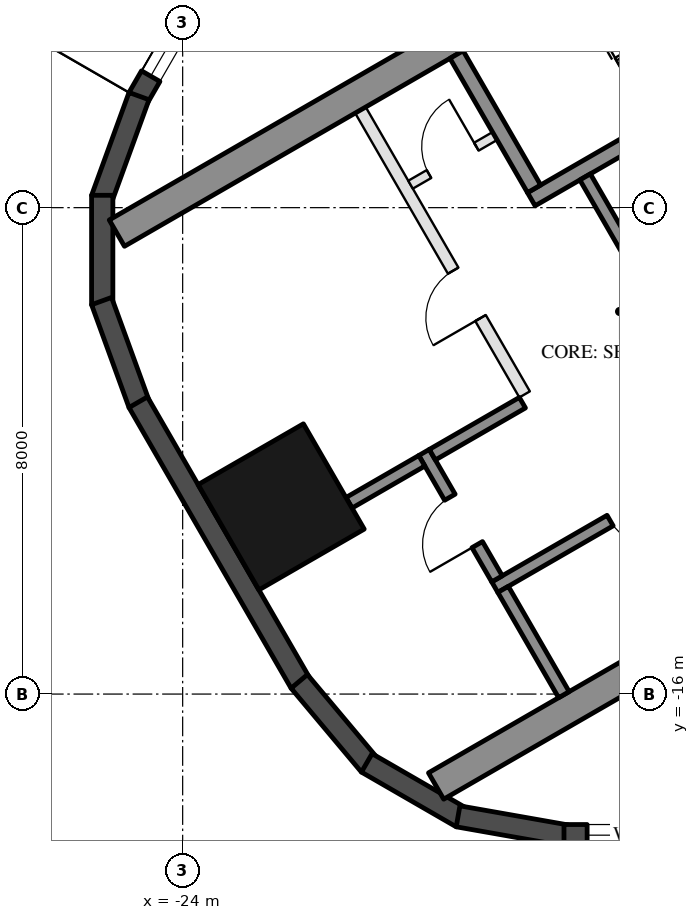
"""IFC4 building model, lengths in metres.
Left out: names, types, materials, properties, quantities, classifications, styles, units other than length and angle.
Written with IfcOpenShell. Run it as: python <this file> out.ifc"""

import sys

from ifc_helpers import new_model, si_unit, direction, frame, frame_2d, origin, origin_2d, place, context, subcontext, project, spatial, rectangle, hollow_rectangle, extrude, boolean, halfspace, element, fill, save


model = new_model("IFC4")
c1 = context("Model", 3, precision=1e-05, world=origin(), true_north=direction((0.0, 1.0)))
c2 = subcontext(c1, "Body", "Model", "MODEL_VIEW")
j1 = project(units=[si_unit("LENGTHUNIT", "METRE"), si_unit("PLANEANGLEUNIT", "RADIAN")], contexts=[c1])
p1 = place(None, origin())
s1 = spatial("IfcSite", under=j1, at=p1, CompositionType="ELEMENT")
p2 = place(p1, origin())
s2 = spatial("IfcBuilding", under=s1, at=p2, CompositionType="ELEMENT")
p3 = place(p2, frame((0.0, 0.0, 268.9)))
s3 = spatial("IfcBuildingStorey", under=s2, at=p3, CompositionType="ELEMENT", Elevation=268.9)
p4 = place(p3, frame((-22.38, -12.921, 0.0), z_axis=(0.0, 0.0, 1.0), x_axis=(-0.5, 0.866025403784, 0.0)))
e1 = element("IfcColumn", 1, at=p4, inside=s3, PredefinedType="COLUMN", context=c2, shape_type="SweptSolid", body=[
    boolean("DIFFERENCE", extrude(hollow_rectangle(XDim=2.0, YDim=2.0, WallThickness=0.05, at=origin_2d()), origin(), (0.0, 0.0, 1.0), 3.7), halfspace(frame((0.0, 0.0, 0.113), z_axis=(0.0, 0.0, 1.0), x_axis=(1.0, 0.0, 0.0)), True)),
])
p5 = place(p3, frame((-22.86, -2.953, 0.0), z_axis=(0.0, 0.0, 1.0), x_axis=(-0.50001992892, -0.866013897511, 0.0)))
e2 = element("IfcWall", 2, at=p5, inside=s3, PredefinedType="SOLIDWALL", context=c2, shape_type="SweptSolid", body=[
    extrude(rectangle(XDim=3.741, YDim=0.35, at=frame_2d((1.871, 0.0))), origin(), (0.0, 0.0, 1.0), 3.55),
])
p6 = place(p5, frame((2.531, 0.0, 0.3)))
e3 = element("IfcOpeningElement", 3, at=p6, cuts=e2, PredefinedType="OPENING", context=c2, shape_type="SweptSolid", body=[
    extrude(rectangle(XDim=0.8, YDim=2.65, at=frame_2d((0.4, 1.325))), frame((0.0, 0.185, 0.0), z_axis=(0.0, -1.0, 0.0), x_axis=(1.0, 0.0, 0.0)), (0.0, 0.0, 1.0), 0.37),
])
p7 = place(p3, frame((-24.718, -6.165, 0.0), z_axis=(0.0, 0.0, 1.0), x_axis=(-0.34206975284, -0.939674562916, 0.0)))
e4 = element("IfcWall", 4, at=p7, inside=s3, PredefinedType="SOLIDWALL", context=c2, shape_type="SweptSolid", body=[
    extrude(rectangle(XDim=1.8, YDim=0.35, at=frame_2d((0.9, 0.0))), origin(), (0.0, 0.0, 1.0), 3.55),
])
p8 = place(p3, frame((-25.323, -7.797, 0.0), z_axis=(0.0, 0.0, 1.0), x_axis=(0.0, -1.0, 0.0)))
e5 = element("IfcWall", 5, at=p8, inside=s3, PredefinedType="SOLIDWALL", context=c2, shape_type="SweptSolid", body=[
    extrude(rectangle(XDim=1.8, YDim=0.35, at=frame_2d((0.9, 0.0))), origin(), (0.0, 0.0, 1.0), 3.55),
])
p9 = place(p3, frame((-25.333, -9.537, 0.0), z_axis=(0.0, 0.0, 1.0), x_axis=(0.34206975284, -0.939674562916, 0.0)))
e6 = element("IfcWall", 6, at=p9, inside=s3, PredefinedType="SOLIDWALL", context=c2, shape_type="SweptSolid", body=[
    extrude(rectangle(XDim=1.8, YDim=0.35, at=frame_2d((0.9, 0.0))), origin(), (0.0, 0.0, 1.0), 3.55),
])
p10 = place(p3, frame((-24.731, -11.2, 0.0), z_axis=(0.0, 0.0, 1.0), x_axis=(0.500025039717, -0.866010946615, 0.0)))
e7 = element("IfcWall", 7, at=p10, inside=s3, PredefinedType="SOLIDWALL", context=c2, shape_type="SweptSolid", body=[
    extrude(rectangle(XDim=5.331, YDim=0.35, at=frame_2d((2.666, 0.0))), origin(), (0.0, 0.0, 1.0), 3.55),
])
p11 = place(p3, frame((-22.083, -15.792, 0.0), z_axis=(0.0, 0.0, 1.0), x_axis=(0.642756114672, -0.766070869471, 0.0)))
e8 = element("IfcWall", 8, at=p11, inside=s3, PredefinedType="SOLIDWALL", context=c2, shape_type="SweptSolid", body=[
    extrude(rectangle(XDim=1.8, YDim=0.35, at=frame_2d((0.9, 0.0))), origin(), (0.0, 0.0, 1.0), 3.55),
])
p12 = place(p3, frame((-20.972, -17.132, 0.0), z_axis=(0.0, 0.0, 1.0), x_axis=(0.866047807691, -0.499961193289, 0.0)))
e9 = element("IfcWall", 9, at=p12, inside=s3, PredefinedType="SOLIDWALL", context=c2, shape_type="SweptSolid", body=[
    extrude(rectangle(XDim=1.8, YDim=0.35, at=frame_2d((0.9, 0.0))), origin(), (0.0, 0.0, 1.0), 3.55),
])
p13 = place(p3, frame((-19.471, -18.011, 0.0), z_axis=(0.0, 0.0, 1.0), x_axis=(0.984810858511, -0.173630564586, 0.0)))
e10 = element("IfcWall", 10, at=p13, inside=s3, PredefinedType="SOLIDWALL", context=c2, shape_type="SweptSolid", body=[
    extrude(rectangle(XDim=1.8, YDim=0.35, at=frame_2d((0.9, 0.0))), origin(), (0.0, 0.0, 1.0), 3.55),
])
p14 = place(p3, frame((-17.729, -18.321, 0.0), z_axis=(0.0, 0.0, 1.0), x_axis=(1.0, 0.0, 0.0)))
e11 = element("IfcWall", 11, at=p14, inside=s3, PredefinedType="SOLIDWALL", context=c2, shape_type="SweptSolid", body=[
    extrude(rectangle(XDim=11.185, YDim=0.35, at=frame_2d((5.593, 0.0))), origin(), (0.0, 0.0, 1.0), 3.55),
])
p15 = place(p14, frame((0.381, 0.0, 0.3)))
e12 = element("IfcOpeningElement", 12, at=p15, cuts=e11, PredefinedType="OPENING", context=c2, shape_type="SweptSolid", body=[
    extrude(rectangle(XDim=1.7, YDim=2.65, at=frame_2d((0.85, 1.325))), frame((0.0, 0.185, 0.0), z_axis=(0.0, -1.0, 0.0), x_axis=(1.0, 0.0, 0.0)), (0.0, 0.0, 1.0), 0.37),
])
p16 = place(p14, frame((7.21, 0.0, 0.0)))
e13 = element("IfcOpeningElement", 13, at=p16, cuts=e11, PredefinedType="OPENING", context=c2, shape_type="SweptSolid", body=[
    extrude(rectangle(XDim=2.4, YDim=2.4, at=frame_2d((1.2, 1.2))), frame((0.0, 0.185, 0.0), z_axis=(0.0, -1.0, 0.0), x_axis=(1.0, 0.0, 0.0)), (0.0, 0.0, 1.0), 0.37),
])
p17 = place(p14, frame((3.516, 0.0, 0.3)))
e14 = element("IfcOpeningElement", 14, at=p17, cuts=e11, PredefinedType="OPENING", context=c2, shape_type="SweptSolid", body=[
    extrude(rectangle(XDim=1.5, YDim=2.65, at=frame_2d((0.75, 1.325))), frame((0.0, 0.185, 0.0), z_axis=(0.0, -1.0, 0.0), x_axis=(1.0, 0.0, 0.0)), (0.0, 0.0, 1.0), 0.37),
])
p18 = place(p14, frame((5.316, 0.0, 0.3)))
e15 = element("IfcOpeningElement", 15, at=p18, cuts=e11, PredefinedType="OPENING", context=c2, shape_type="SweptSolid", body=[
    extrude(rectangle(XDim=1.5, YDim=2.65, at=frame_2d((0.75, 1.325))), frame((0.0, 0.185, 0.0), z_axis=(0.0, -1.0, 0.0), x_axis=(1.0, 0.0, 0.0)), (0.0, 0.0, 1.0), 0.37),
])
for number, where, z_axis, x_axis in (
    (16, (-13.797, -1.903, 0.0), (0.0, 0.0, 1.0), (-0.866, -0.5, 0.0)),
    (17, (-8.547, -10.997, 0.0), (0.0, 0.0, 1.0), (-0.866, -0.5, 0.0)),
):
    element("IfcWall", number, at=place(p3, frame(where, z_axis=z_axis, x_axis=x_axis)), inside=s3, PredefinedType="SHEAR", context=c2, shape_type="SweptSolid", body=[
        extrude(rectangle(XDim=13.031, YDim=0.5, at=frame_2d((6.516, 0.0))), origin(), (0.0, 0.0, 1.0), 3.5),
    ])
p19 = place(p3, frame((-12.681, -4.636, 0.0), z_axis=(0.0, 0.0, 1.0), x_axis=(-0.866021702275, -0.500006411147, 0.0)))
e18 = element("IfcWall", 18, at=p19, inside=s3, PredefinedType="SHEAR", context=c2, shape_type="SweptSolid", body=[
    extrude(rectangle(XDim=6.45, YDim=0.25, at=frame_2d((3.225, 0.0))), origin(), (0.0, 0.0, 1.0), 3.5),
])
p20 = place(p19, frame((0.3, 0.0, 0.0)))
e19 = element("IfcOpeningElement", 19, at=p20, cuts=e18, PredefinedType="OPENING", context=c2, shape_type="SweptSolid", body=[
    extrude(rectangle(XDim=1.0, YDim=2.1, at=frame_2d((0.5, 1.05))), frame((0.0, 0.135, 0.0), z_axis=(0.0, -1.0, 0.0), x_axis=(1.0, 0.0, 0.0)), (0.0, 0.0, 1.0), 0.27),
])
p21 = place(p3, frame((-19.496, -5.482, 0.0), z_axis=(0.0, 0.0, 1.0), x_axis=(0.499990435942, -0.866030925526, 0.0)))
e20 = element("IfcWall", 20, at=p21, inside=s3, PredefinedType="SHEAR", context=c2, shape_type="SweptSolid", body=[
    extrude(rectangle(XDim=2.55, YDim=0.25, at=frame_2d((1.275, 0.0))), origin(), (0.0, 0.0, 1.0), 3.5),
])
p22 = place(p3, frame((-17.381, -7.495, 0.0), z_axis=(0.0, 0.0, 1.0), x_axis=(0.500011755427, -0.866018616679, 0.0)))
e21 = element("IfcWall", 21, at=p22, inside=s3, PredefinedType="SHEAR", context=c2, shape_type="SweptSolid", body=[
    extrude(rectangle(XDim=2.8, YDim=0.2, at=frame_2d((1.4, 0.0))), origin(), (0.0, 0.0, 1.0), 3.5),
])
p23 = place(p3, frame((-10.068, -9.162, 0.0), z_axis=(0.0, 0.0, 1.0), x_axis=(-0.866032725843, -0.499987317609, 0.0)))
e22 = element("IfcWall", 22, at=p23, inside=s3, PredefinedType="SHEAR", context=c2, shape_type="SweptSolid", body=[
    extrude(rectangle(XDim=10.16, YDim=0.2, at=frame_2d((5.08, 0.0))), origin(), (0.0, 0.0, 1.0), 3.5),
])
p24 = place(p23, frame((1.99, 0.0, 0.0)))
e23 = element("IfcOpeningElement", 23, at=p24, cuts=e22, PredefinedType="OPENING", context=c2, shape_type="SweptSolid", body=[
    extrude(rectangle(XDim=0.9, YDim=2.1, at=frame_2d((0.45, 1.05))), frame((0.0, 0.11, 0.0), z_axis=(0.0, -1.0, 0.0), x_axis=(1.0, 0.0, 0.0)), (0.0, 0.0, 1.0), 0.22),
])
p25 = place(p23, frame((7.07, 0.0, 0.0)))
e24 = element("IfcOpeningElement", 24, at=p25, cuts=e22, PredefinedType="OPENING", context=c2, shape_type="SweptSolid", body=[
    extrude(rectangle(XDim=0.9, YDim=2.1, at=frame_2d((0.45, 1.05))), frame((0.0, 0.11, 0.0), z_axis=(0.0, -1.0, 0.0), x_axis=(1.0, 0.0, 0.0)), (0.0, 0.0, 1.0), 0.22),
])
p26 = place(p3, frame((-20.031, -12.026, 0.0), z_axis=(0.0, 0.0, 1.0), x_axis=(0.500033551112, -0.866006032174, 0.0)))
e25 = element("IfcWall", 25, at=p26, inside=s3, PredefinedType="SHEAR", context=c2, shape_type="SweptSolid", body=[
    extrude(rectangle(XDim=2.4, YDim=0.2, at=frame_2d((1.2, 0.0))), origin(), (0.0, 0.0, 1.0), 3.5),
])
p27 = place(p26, frame((0.85, 0.0, 0.0)))
e26 = element("IfcOpeningElement", 26, at=p27, cuts=e25, PredefinedType="OPENING", context=c2, shape_type="SweptSolid", body=[
    extrude(rectangle(XDim=0.9, YDim=2.1, at=frame_2d((0.45, 1.05))), frame((0.0, 0.11, 0.0), z_axis=(0.0, -1.0, 0.0), x_axis=(1.0, 0.0, 0.0)), (0.0, 0.0, 1.0), 0.22),
])
p28 = place(p3, frame((-18.413, -11.208, 0.0), z_axis=(0.0, 0.0, 1.0), x_axis=(-0.866038183914, -0.499977863513, 0.0)))
e27 = element("IfcWall", 27, at=p28, inside=s3, PredefinedType="SHEAR", context=c2, shape_type="SweptSolid", body=[
    extrude(rectangle(XDim=1.71, YDim=0.2, at=frame_2d((0.855, 0.0))), origin(), (0.0, 0.0, 1.0), 3.5),
])
p29 = place(p3, frame((-18.73, -14.278, 0.0), z_axis=(0.0, 0.0, 1.0), x_axis=(0.50002537861, -0.866010750942, 0.0)))
e28 = element("IfcWall", 28, at=p29, inside=s3, PredefinedType="SHEAR", context=c2, shape_type="SweptSolid", body=[
    extrude(rectangle(XDim=2.0, YDim=0.2, at=frame_2d((1.0, 0.0))), origin(), (0.0, 0.0, 1.0), 3.5),
])
p30 = place(p3, frame((-20.067, -12.163, 0.0), z_axis=(0.0, 0.0, 1.0), x_axis=(-0.866094443108, -0.499880401313, 0.0)))
e29 = element("IfcWall", 29, at=p30, inside=s3, PredefinedType="SHEAR", context=c2, shape_type="SweptSolid", body=[
    extrude(rectangle(XDim=1.383, YDim=0.2, at=frame_2d((0.691, 0.0))), origin(), (0.0, 0.0, 1.0), 3.5),
])
p31 = place(p3, frame((-21.076, -6.395, 0.0), z_axis=(0.0, 0.0, 1.0), x_axis=(0.50001468107, -0.866016927499, 0.0)))
e30 = element("IfcWall", 30, at=p31, inside=s3, PredefinedType="PARTITIONING", context=c2, shape_type="SweptSolid", body=[
    extrude(rectangle(XDim=5.4, YDim=0.2, at=frame_2d((2.7, 0.0))), origin(), (0.0, 0.0, 1.0), 3.5),
])
p32 = place(p31, frame((3.05, 0.0, 0.0)))
e31 = element("IfcOpeningElement", 31, at=p32, cuts=e30, PredefinedType="OPENING", context=c2, shape_type="SweptSolid", body=[
    extrude(rectangle(XDim=0.9, YDim=2.1, at=frame_2d((0.45, 1.05))), frame((0.0, 0.11, 0.0), z_axis=(0.0, -1.0, 0.0), x_axis=(1.0, 0.0, 0.0)), (0.0, 0.0, 1.0), 0.22),
])
p33 = place(p3, frame((-18.866, -6.822, 0.0), z_axis=(0.0, 0.0, 1.0), x_axis=(-0.866028054938, -0.499995408039, 0.0)))
e32 = element("IfcWall", 32, at=p33, inside=s3, PredefinedType="PARTITIONING", context=c2, shape_type="SweptSolid", body=[
    extrude(rectangle(XDim=1.6, YDim=0.15, at=frame_2d((0.8, 0.0))), origin(), (0.0, 0.0, 1.0), 3.5),
])
p34 = place(p33, frame((0.35, 0.0, 0.0)))
e33 = element("IfcOpeningElement", 33, at=p34, cuts=e32, PredefinedType="OPENING", context=c2, shape_type="SweptSolid", body=[
    extrude(rectangle(XDim=0.9, YDim=2.1, at=frame_2d((0.45, 1.05))), frame((0.0, 0.085, 0.0), z_axis=(0.0, -1.0, 0.0), x_axis=(1.0, 0.0, 0.0)), (0.0, 0.0, 1.0), 0.17),
])
p35 = place(p15, origin())
e34 = element("IfcWindow", 34, at=p35, inside=s3, PartitioningType="SINGLE_PANEL", PredefinedType="WINDOW", context=c2, shape_type="SweptSolid", body=[
    extrude(rectangle(XDim=1.7, YDim=2.65, at=frame_2d((0.85, 1.325))), frame((0.0, 0.03, 0.0), z_axis=(0.0, -1.0, 0.0), x_axis=(1.0, 0.0, 0.0)), (0.0, 0.0, 1.0), 0.06),
])
fill(e12, e34)
p36 = place(p6, origin())
e35 = element("IfcWindow", 35, at=p36, inside=s3, PartitioningType="SINGLE_PANEL", PredefinedType="WINDOW", context=c2, shape_type="SweptSolid", body=[
    extrude(rectangle(XDim=0.8, YDim=2.65, at=frame_2d((0.4, 1.325))), frame((0.0, 0.03, 0.0), z_axis=(0.0, -1.0, 0.0), x_axis=(1.0, 0.0, 0.0)), (0.0, 0.0, 1.0), 0.06),
])
fill(e3, e35)
p37 = place(p34, frame((0.9, 0.0, 0.0), z_axis=(0.0, 0.0, 1.0), x_axis=(-1.0, 0.0, 0.0)))
e36 = element("IfcDoor", 36, at=p37, inside=s3, OperationType="SINGLE_SWING_RIGHT", PredefinedType="DOOR", context=c2, shape_type="SweptSolid", body=[
    extrude(rectangle(XDim=0.9, YDim=2.1, at=frame_2d((0.45, 1.05))), frame((0.0, 0.025, 0.0), z_axis=(0.0, -1.0, 0.0), x_axis=(1.0, 0.0, 0.0)), (0.0, 0.0, 1.0), 0.05),
])
fill(e33, e36)
p38 = place(p25, origin())
e37 = element("IfcDoor", 37, at=p38, inside=s3, OperationType="SINGLE_SWING_LEFT", PredefinedType="DOOR", context=c2, shape_type="SweptSolid", body=[
    extrude(rectangle(XDim=0.9, YDim=2.1, at=frame_2d((0.45, 1.05))), frame((0.0, 0.025, 0.0), z_axis=(0.0, -1.0, 0.0), x_axis=(1.0, 0.0, 0.0)), (0.0, 0.0, 1.0), 0.05),
])
fill(e24, e37)
p39 = place(p27, frame((0.9, 0.0, 0.0), z_axis=(0.0, 0.0, 1.0), x_axis=(-1.0, 0.0, 0.0)))
e38 = element("IfcDoor", 38, at=p39, inside=s3, OperationType="SINGLE_SWING_LEFT", PredefinedType="DOOR", context=c2, shape_type="SweptSolid", body=[
    extrude(rectangle(XDim=0.9, YDim=2.1, at=frame_2d((0.45, 1.05))), frame((0.0, 0.025, 0.0), z_axis=(0.0, -1.0, 0.0), x_axis=(1.0, 0.0, 0.0)), (0.0, 0.0, 1.0), 0.05),
])
fill(e26, e38)
p40 = place(p32, frame((0.9, 0.0, 0.0), z_axis=(0.0, 0.0, 1.0), x_axis=(-1.0, 0.0, 0.0)))
e39 = element("IfcDoor", 39, at=p40, inside=s3, OperationType="SINGLE_SWING_LEFT", PredefinedType="DOOR", context=c2, shape_type="SweptSolid", body=[
    extrude(rectangle(XDim=0.9, YDim=2.1, at=frame_2d((0.45, 1.05))), frame((0.0, 0.025, 0.0), z_axis=(0.0, -1.0, 0.0), x_axis=(1.0, 0.0, 0.0)), (0.0, 0.0, 1.0), 0.05),
])
fill(e31, e39)
save(model, sys.argv[1])
